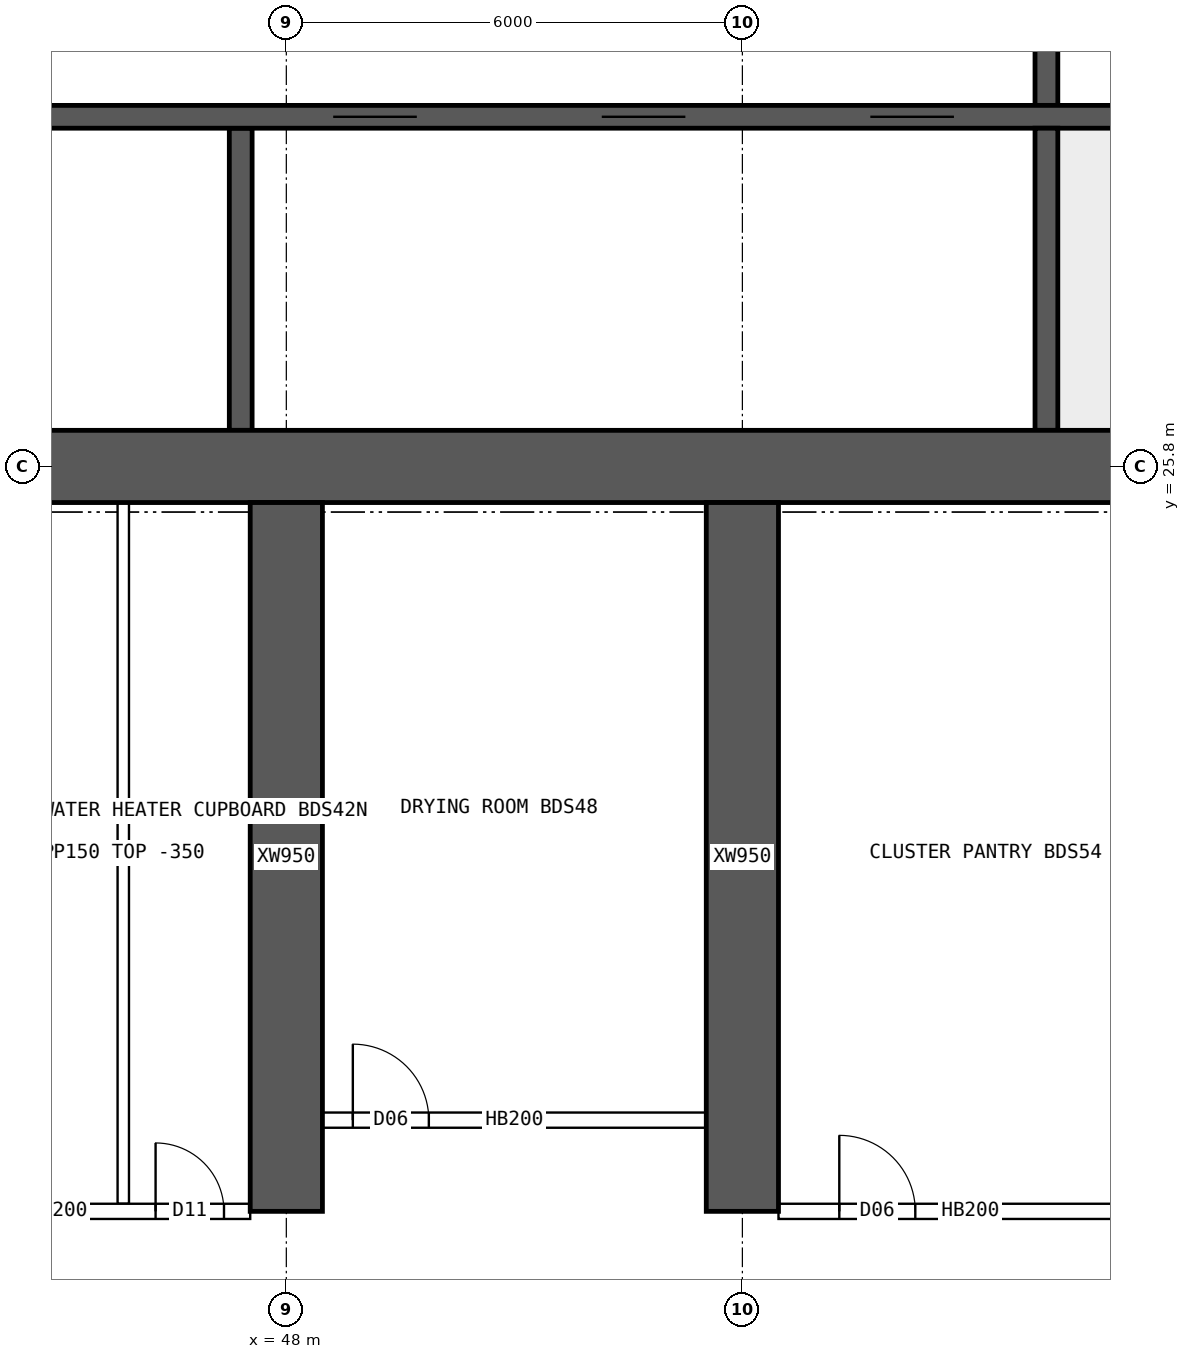
"""IFC4 building model, lengths in metres.
Left out: names, types, materials, properties, quantities, classifications, styles, units other than length and angle.
Written with IfcOpenShell. Run it as: python <this file> out.ifc"""

import sys

from ifc_helpers import new_model, si_unit, direction, frame, frame_2d, origin, place, context, subcontext, project, spatial, rectangle, extrude, element, fill, save


model = new_model("IFC4")
c1 = context("Model", 3, precision=1e-05, world=origin(), true_north=direction((0.0, 1.0)))
c2 = subcontext(c1, "Body", "Model", "MODEL_VIEW")
j1 = project(units=[si_unit("LENGTHUNIT", "METRE"), si_unit("PLANEANGLEUNIT", "RADIAN")], contexts=[c1])
p1 = place(None, origin())
s1 = spatial("IfcSite", under=j1, at=p1, CompositionType="ELEMENT")
p2 = place(p1, origin())
s2 = spatial("IfcBuilding", under=s1, at=p2, CompositionType="ELEMENT")
p3 = place(p2, frame((0.0, 0.0, 129.4)))
s3 = spatial("IfcBuildingStorey", under=s2, at=p3, CompositionType="ELEMENT", Elevation=129.4)
p4 = place(p3, frame((18.0, 25.8, 0.0), z_axis=(0.0, 0.0, 1.0), x_axis=(1.0, 0.0, 0.0)))
e1 = element("IfcWall", 1, at=p4, inside=s3, PredefinedType="SHEAR", context=c2, shape_type="SweptSolid", body=[
    extrude(rectangle(XDim=48.0, YDim=0.95, at=frame_2d((24.0, 0.0))), origin(), (0.0, 0.0, 1.0), 3.75),
])
p5 = place(p3, frame((18.475, 30.4, 0.0), z_axis=(0.0, 0.0, 1.0), x_axis=(1.0, 0.0, 0.0)))
e2 = element("IfcWall", 2, at=p5, inside=s3, PredefinedType="SHEAR", context=c2, shape_type="SweptSolid", body=[
    extrude(rectangle(XDim=47.05, YDim=0.3, at=frame_2d((23.525, 0.0))), origin(), (0.0, 0.0, 1.0), 3.75),
])
p6 = place(p5, frame((0.4, 0.0, 0.0)))
e3 = element("IfcOpeningElement", 3, at=p6, cuts=e2, PredefinedType="OPENING", context=c2, shape_type="SweptSolid", body=[
    extrude(rectangle(XDim=1.0, YDim=2.1, at=frame_2d((0.5, 1.05))), frame((0.0, 0.16, 0.0), z_axis=(0.0, -1.0, 0.0), x_axis=(1.0, 0.0, 0.0)), (0.0, 0.0, 1.0), 0.32),
])
p7 = place(p5, frame((45.65, 0.0, 0.0)))
e4 = element("IfcOpeningElement", 4, at=p7, cuts=e2, PredefinedType="OPENING", context=c2, shape_type="SweptSolid", body=[
    extrude(rectangle(XDim=1.0, YDim=2.1, at=frame_2d((0.5, 1.05))), frame((0.0, 0.16, 0.0), z_axis=(0.0, -1.0, 0.0), x_axis=(1.0, 0.0, 0.0)), (0.0, 0.0, 1.0), 0.32),
])
p8 = place(p5, frame((8.275, 0.0, 0.0)))
e5 = element("IfcOpeningElement", 5, at=p8, cuts=e2, PredefinedType="OPENING", context=c2, shape_type="SweptSolid", body=[
    extrude(rectangle(XDim=1.1, YDim=2.1, at=frame_2d((0.55, 1.05))), frame((0.0, 0.16, 0.0), z_axis=(0.0, -1.0, 0.0), x_axis=(1.0, 0.0, 0.0)), (0.0, 0.0, 1.0), 0.32),
])
p9 = place(p5, frame((10.875, 0.0, 0.0)))
e6 = element("IfcOpeningElement", 6, at=p9, cuts=e2, PredefinedType="OPENING", context=c2, shape_type="SweptSolid", body=[
    extrude(rectangle(XDim=1.1, YDim=2.1, at=frame_2d((0.55, 1.05))), frame((0.0, 0.16, 0.0), z_axis=(0.0, -1.0, 0.0), x_axis=(1.0, 0.0, 0.0)), (0.0, 0.0, 1.0), 0.32),
])
p10 = place(p5, frame((13.475, 0.0, 0.0)))
e7 = element("IfcOpeningElement", 7, at=p10, cuts=e2, PredefinedType="OPENING", context=c2, shape_type="SweptSolid", body=[
    extrude(rectangle(XDim=1.1, YDim=2.1, at=frame_2d((0.55, 1.05))), frame((0.0, 0.16, 0.0), z_axis=(0.0, -1.0, 0.0), x_axis=(1.0, 0.0, 0.0)), (0.0, 0.0, 1.0), 0.32),
])
p11 = place(p5, frame((16.075, 0.0, 0.0)))
e8 = element("IfcOpeningElement", 8, at=p11, cuts=e2, PredefinedType="OPENING", context=c2, shape_type="SweptSolid", body=[
    extrude(rectangle(XDim=1.1, YDim=2.1, at=frame_2d((0.55, 1.05))), frame((0.0, 0.16, 0.0), z_axis=(0.0, -1.0, 0.0), x_axis=(1.0, 0.0, 0.0)), (0.0, 0.0, 1.0), 0.32),
])
p12 = place(p5, frame((18.85, 0.0, 0.0)))
e9 = element("IfcOpeningElement", 9, at=p12, cuts=e2, PredefinedType="OPENING", context=c2, shape_type="SweptSolid", body=[
    extrude(rectangle(XDim=0.9, YDim=2.1, at=frame_2d((0.45, 1.05))), frame((0.0, 0.16, 0.0), z_axis=(0.0, -1.0, 0.0), x_axis=(1.0, 0.0, 0.0)), (0.0, 0.0, 1.0), 0.32),
])
p13 = place(p5, frame((30.142, 0.0, 0.0)))
e10 = element("IfcOpeningElement", 10, at=p13, cuts=e2, PredefinedType="OPENING", context=c2, shape_type="SweptSolid", body=[
    extrude(rectangle(XDim=1.1, YDim=2.1, at=frame_2d((0.55, 1.05))), frame((0.0, 0.16, 0.0), z_axis=(0.0, -1.0, 0.0), x_axis=(1.0, 0.0, 0.0)), (0.0, 0.0, 1.0), 0.32),
])
p14 = place(p5, frame((33.675, 0.0, 0.0)))
e11 = element("IfcOpeningElement", 11, at=p14, cuts=e2, PredefinedType="OPENING", context=c2, shape_type="SweptSolid", body=[
    extrude(rectangle(XDim=1.1, YDim=2.1, at=frame_2d((0.55, 1.05))), frame((0.0, 0.16, 0.0), z_axis=(0.0, -1.0, 0.0), x_axis=(1.0, 0.0, 0.0)), (0.0, 0.0, 1.0), 0.32),
])
p15 = place(p5, frame((37.208, 0.0, 0.0)))
e12 = element("IfcOpeningElement", 12, at=p15, cuts=e2, PredefinedType="OPENING", context=c2, shape_type="SweptSolid", body=[
    extrude(rectangle(XDim=1.1, YDim=2.1, at=frame_2d((0.55, 1.05))), frame((0.0, 0.16, 0.0), z_axis=(0.0, -1.0, 0.0), x_axis=(1.0, 0.0, 0.0)), (0.0, 0.0, 1.0), 0.32),
])
p16 = place(p3, frame((58.0, 26.275, 0.0), z_axis=(0.0, 0.0, 1.0), x_axis=(0.0, 1.0, 0.0)))
e13 = element("IfcWall", 13, at=p16, inside=s3, PredefinedType="SHEAR", context=c2, shape_type="SweptSolid", body=[
    extrude(rectangle(XDim=3.975, YDim=0.3, at=frame_2d((1.988, 0.0))), origin(), (0.0, 0.0, 1.0), 3.75),
])
p17 = place(p3, frame((58.0, 30.55, 0.0), z_axis=(0.0, 0.0, 1.0), x_axis=(0.0, 1.0, 0.0)))
e14 = element("IfcWall", 14, at=p17, inside=s3, PredefinedType="SHEAR", context=c2, shape_type="SweptSolid", body=[
    extrude(rectangle(XDim=3.9, YDim=0.3, at=frame_2d((1.95, 0.0))), origin(), (0.0, 0.0, 1.0), 3.75),
])
p18 = place(p17, frame((1.4, 0.0, 0.0)))
e15 = element("IfcOpeningElement", 15, at=p18, cuts=e14, PredefinedType="OPENING", context=c2, shape_type="SweptSolid", body=[
    extrude(rectangle(XDim=1.2, YDim=2.1, at=frame_2d((0.6, 1.05))), frame((0.0, 0.16, 0.0), z_axis=(0.0, -1.0, 0.0), x_axis=(1.0, 0.0, 0.0)), (0.0, 0.0, 1.0), 0.32),
])
p19 = place(p3, frame((47.4, 26.275, 0.0), z_axis=(0.0, 0.0, 1.0), x_axis=(0.0, 1.0, 0.0)))
e16 = element("IfcWall", 16, at=p19, inside=s3, PredefinedType="SHEAR", context=c2, shape_type="SweptSolid", body=[
    extrude(rectangle(XDim=3.975, YDim=0.3, at=frame_2d((1.988, 0.0))), origin(), (0.0, 0.0, 1.0), 3.75),
])
for number, where, z_axis, x_axis in (
    (17, (48.0, 16.0, 0.0), (0.0, 0.0, 1.0), (0.0, 1.0, 0.0)),
    (18, (54.0, 16.0, 0.0), (0.0, 0.0, 1.0), (0.0, 1.0, 0.0)),
):
    element("IfcWall", number, at=place(p3, frame(where, z_axis=z_axis, x_axis=x_axis)), inside=s3, PredefinedType="SHEAR", context=c2, shape_type="SweptSolid", body=[
        extrude(rectangle(XDim=9.325, YDim=0.95, at=frame_2d((4.663, 0.0))), origin(), (0.0, 0.0, 1.0), 3.75),
    ])
p20 = place(p3, frame((42.475, 16.0, 0.0), z_axis=(0.0, 0.0, 1.0), x_axis=(1.0, 0.0, 0.0)))
e19 = element("IfcWall", 19, at=p20, inside=s3, PredefinedType="SOLIDWALL", context=c2, shape_type="SweptSolid", body=[
    extrude(rectangle(XDim=5.05, YDim=0.2, at=frame_2d((2.525, 0.0))), origin(), (0.0, 0.0, 1.0), 3.4),
])
p21 = place(p20, frame((0.35, 0.0, 0.0)))
e20 = element("IfcOpeningElement", 20, at=p21, cuts=e19, PredefinedType="OPENING", context=c2, shape_type="SweptSolid", body=[
    extrude(rectangle(XDim=0.9, YDim=2.1, at=frame_2d((0.45, 1.05))), frame((0.0, 0.11, 0.0), z_axis=(0.0, -1.0, 0.0), x_axis=(1.0, 0.0, 0.0)), (0.0, 0.0, 1.0), 0.22),
])
p22 = place(p20, frame((3.805, 0.0, 0.0)))
e21 = element("IfcOpeningElement", 21, at=p22, cuts=e19, PredefinedType="OPENING", context=c2, shape_type="SweptSolid", body=[
    extrude(rectangle(XDim=0.9, YDim=2.1, at=frame_2d((0.45, 1.05))), frame((0.0, 0.11, 0.0), z_axis=(0.0, -1.0, 0.0), x_axis=(1.0, 0.0, 0.0)), (0.0, 0.0, 1.0), 0.22),
])
p23 = place(p3, frame((54.475, 16.0, 0.0), z_axis=(0.0, 0.0, 1.0), x_axis=(1.0, 0.0, 0.0)))
e22 = element("IfcWall", 22, at=p23, inside=s3, PredefinedType="SOLIDWALL", context=c2, shape_type="SweptSolid", body=[
    extrude(rectangle(XDim=5.05, YDim=0.2, at=frame_2d((2.525, 0.0))), origin(), (0.0, 0.0, 1.0), 3.4),
])
p24 = place(p23, frame((0.8, 0.0, 0.0)))
e23 = element("IfcOpeningElement", 23, at=p24, cuts=e22, PredefinedType="OPENING", context=c2, shape_type="SweptSolid", body=[
    extrude(rectangle(XDim=1.0, YDim=2.1, at=frame_2d((0.5, 1.05))), frame((0.0, 0.11, 0.0), z_axis=(0.0, -1.0, 0.0), x_axis=(1.0, 0.0, 0.0)), (0.0, 0.0, 1.0), 0.22),
])
p25 = place(p3, frame((45.855, 16.1, 0.0), z_axis=(0.0, 0.0, 1.0), x_axis=(0.0, 1.0, 0.0)))
e24 = element("IfcWall", 24, at=p25, inside=s3, PredefinedType="PARTITIONING", context=c2, shape_type="SweptSolid", body=[
    extrude(rectangle(XDim=9.225, YDim=0.15, at=frame_2d((4.612, 0.0))), origin(), (0.0, 0.0, 1.0), 3.4),
])
p26 = place(p3, frame((48.475, 17.2, 0.0), z_axis=(0.0, 0.0, 1.0), x_axis=(1.0, 0.0, 0.0)))
e25 = element("IfcWall", 25, at=p26, inside=s3, PredefinedType="SOLIDWALL", context=c2, shape_type="SweptSolid", body=[
    extrude(rectangle(XDim=5.05, YDim=0.2, at=frame_2d((2.525, 0.0))), origin(), (0.0, 0.0, 1.0), 3.4),
])
p27 = place(p26, frame((0.4, 0.0, 0.0)))
e26 = element("IfcOpeningElement", 26, at=p27, cuts=e25, PredefinedType="OPENING", context=c2, shape_type="SweptSolid", body=[
    extrude(rectangle(XDim=1.0, YDim=2.1, at=frame_2d((0.5, 1.05))), frame((0.0, 0.11, 0.0), z_axis=(0.0, -1.0, 0.0), x_axis=(1.0, 0.0, 0.0)), (0.0, 0.0, 1.0), 0.22),
])
p28 = place(p13, origin())
e27 = element("IfcDoor", 27, at=p28, inside=s3, OperationType="DOUBLE_DOOR_SLIDING", PredefinedType="DOOR", context=c2, shape_type="SweptSolid", body=[
    extrude(rectangle(XDim=1.1, YDim=2.1, at=frame_2d((0.55, 1.05))), frame((0.0, 0.025, 0.0), z_axis=(0.0, -1.0, 0.0), x_axis=(1.0, 0.0, 0.0)), (0.0, 0.0, 1.0), 0.05),
])
fill(e10, e27)
p29 = place(p14, origin())
e28 = element("IfcDoor", 28, at=p29, inside=s3, OperationType="DOUBLE_DOOR_SLIDING", PredefinedType="DOOR", context=c2, shape_type="SweptSolid", body=[
    extrude(rectangle(XDim=1.1, YDim=2.1, at=frame_2d((0.55, 1.05))), frame((0.0, 0.025, 0.0), z_axis=(0.0, -1.0, 0.0), x_axis=(1.0, 0.0, 0.0)), (0.0, 0.0, 1.0), 0.05),
])
fill(e11, e28)
p30 = place(p15, origin())
e29 = element("IfcDoor", 29, at=p30, inside=s3, OperationType="DOUBLE_DOOR_SLIDING", PredefinedType="DOOR", context=c2, shape_type="SweptSolid", body=[
    extrude(rectangle(XDim=1.1, YDim=2.1, at=frame_2d((0.55, 1.05))), frame((0.0, 0.025, 0.0), z_axis=(0.0, -1.0, 0.0), x_axis=(1.0, 0.0, 0.0)), (0.0, 0.0, 1.0), 0.05),
])
fill(e12, e29)
p31 = place(p22, origin())
e30 = element("IfcDoor", 30, at=p31, inside=s3, OperationType="SINGLE_SWING_LEFT", PredefinedType="DOOR", context=c2, shape_type="SweptSolid", body=[
    extrude(rectangle(XDim=0.9, YDim=2.1, at=frame_2d((0.45, 1.05))), frame((0.0, 0.025, 0.0), z_axis=(0.0, -1.0, 0.0), x_axis=(1.0, 0.0, 0.0)), (0.0, 0.0, 1.0), 0.05),
])
fill(e21, e30)
p32 = place(p27, origin())
e31 = element("IfcDoor", 31, at=p32, inside=s3, OperationType="SINGLE_SWING_LEFT", PredefinedType="DOOR", context=c2, shape_type="SweptSolid", body=[
    extrude(rectangle(XDim=1.0, YDim=2.1, at=frame_2d((0.5, 1.05))), frame((0.0, 0.025, 0.0), z_axis=(0.0, -1.0, 0.0), x_axis=(1.0, 0.0, 0.0)), (0.0, 0.0, 1.0), 0.05),
])
fill(e26, e31)
p33 = place(p24, origin())
e32 = element("IfcDoor", 32, at=p33, inside=s3, OperationType="SINGLE_SWING_LEFT", PredefinedType="DOOR", context=c2, shape_type="SweptSolid", body=[
    extrude(rectangle(XDim=1.0, YDim=2.1, at=frame_2d((0.5, 1.05))), frame((0.0, 0.025, 0.0), z_axis=(0.0, -1.0, 0.0), x_axis=(1.0, 0.0, 0.0)), (0.0, 0.0, 1.0), 0.05),
])
fill(e23, e32)
save(model, sys.argv[1])
